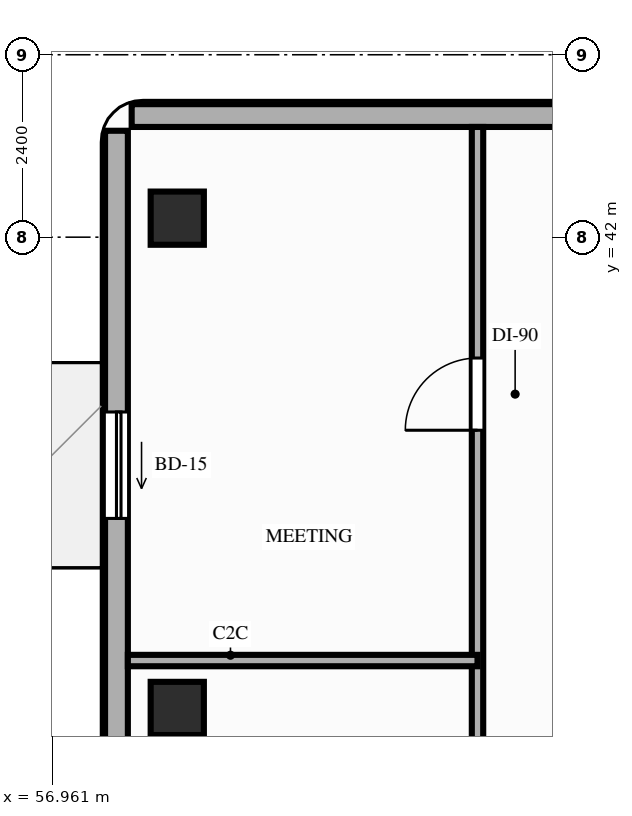
"""IFC4 building model, lengths in metres.
Left out: names, types, materials, properties, quantities, classifications, styles, units other than length and angle.
Written with IfcOpenShell. Run it as: python <this file> out.ifc"""

import sys

from ifc_helpers import new_model, si_unit, direction, frame, frame_2d, origin, origin_2d, place, context, subcontext, project, spatial, rectangle, extrude, element, fill, save


model = new_model("IFC4")
c1 = context("Model", 3, precision=1e-05, world=origin(), true_north=direction((0.0, 1.0)))
c2 = subcontext(c1, "Body", "Model", "MODEL_VIEW")
j1 = project(units=[si_unit("LENGTHUNIT", "METRE"), si_unit("PLANEANGLEUNIT", "RADIAN")], contexts=[c1])
p1 = place(None, origin())
s1 = spatial("IfcSite", under=j1, at=p1, CompositionType="ELEMENT")
p2 = place(p1, origin())
s2 = spatial("IfcBuilding", under=s1, at=p2, CompositionType="ELEMENT")
p3 = place(p2, frame((0.0, 0.0, 96.2)))
s3 = spatial("IfcBuildingStorey", under=s2, at=p3, CompositionType="ELEMENT", Elevation=96.2)
for number, where, z_axis, x_axis in (
    (1, (58.6, 35.8, 0.0), (0.0, 0.0, 1.0), (1.0, 0.0, 0.0)),
    (2, (58.6, 42.25, 0.0), (0.0, 0.0, 1.0), (1.0, 0.0, 0.0)),
):
    element("IfcColumn", number, at=place(p3, frame(where, z_axis=z_axis, x_axis=x_axis)), inside=s3, PredefinedType="COLUMN", context=c2, shape_type="SweptSolid", body=[
        extrude(rectangle(XDim=0.7, YDim=0.7, at=origin_2d()), origin(), (0.0, 0.0, 1.0), 3.2),
    ])
p4 = place(p3, frame((57.8, 43.4, 0.0), z_axis=(0.0, 0.0, 1.0), x_axis=(0.0, -1.0, 0.0)))
e3 = element("IfcWall", 3, at=p4, inside=s3, PredefinedType="STANDARD", context=c2, shape_type="SweptSolid", body=[
    extrude(rectangle(XDim=22.6, YDim=0.3, at=frame_2d((11.3, 0.0))), origin(), (0.0, 0.0, 1.0), 2.72),
])
p5 = place(p4, frame((3.7, 0.0, 0.0)))
e4 = element("IfcOpeningElement", 4, at=p5, cuts=e3, PredefinedType="OPENING", context=c2, shape_type="SweptSolid", body=[
    extrude(rectangle(XDim=1.4, YDim=2.1, at=frame_2d((0.7, 1.05))), frame((0.0, 0.16, 0.0), z_axis=(0.0, -1.0, 0.0), x_axis=(1.0, 0.0, 0.0)), (0.0, 0.0, 1.0), 0.32),
])
p6 = place(p4, frame((10.3, 0.0, 0.85)))
e5 = element("IfcOpeningElement", 5, at=p6, cuts=e3, PredefinedType="OPENING", context=c2, shape_type="SweptSolid", body=[
    extrude(rectangle(XDim=1.6, YDim=1.57, at=frame_2d((0.8, 0.785))), frame((0.0, 0.16, 0.0), z_axis=(0.0, -1.0, 0.0), x_axis=(1.0, 0.0, 0.0)), (0.0, 0.0, 1.0), 0.32),
])
p7 = place(p3, frame((72.8, 43.6, 0.0), z_axis=(0.0, 0.0, 1.0), x_axis=(-1.0, 0.0, 0.0)))
e6 = element("IfcWall", 6, at=p7, inside=s3, PredefinedType="STANDARD", context=c2, shape_type="SweptSolid", body=[
    extrude(rectangle(XDim=14.8, YDim=0.3, at=frame_2d((7.4, 0.0))), origin(), (0.0, 0.0, 1.0), 3.02),
])
p8 = place(p3, frame((62.55, 20.75, 0.0), z_axis=(0.0, 0.0, 1.0), x_axis=(0.0, 1.0, 0.0)))
e7 = element("IfcWall", 7, at=p8, inside=s3, PredefinedType="PARTITIONING", context=c2, shape_type="SweptSolid", body=[
    extrude(rectangle(XDim=22.7, YDim=0.15, at=frame_2d((11.35, 0.0))), origin(), (0.0, 0.0, 1.0), 2.6),
])
p9 = place(p8, frame((1.05, 0.0, 0.0)))
e8 = element("IfcOpeningElement", 8, at=p9, cuts=e7, PredefinedType="OPENING", context=c2, shape_type="SweptSolid", body=[
    extrude(rectangle(XDim=0.85, YDim=2.1, at=frame_2d((0.425, 1.05))), frame((0.0, 0.085, 0.0), z_axis=(0.0, -1.0, 0.0), x_axis=(1.0, 0.0, 0.0)), (0.0, 0.0, 1.0), 0.17),
])
p10 = place(p8, frame((3.43, 0.0, 0.0)))
e9 = element("IfcOpeningElement", 9, at=p10, cuts=e7, PredefinedType="OPENING", context=c2, shape_type="SweptSolid", body=[
    extrude(rectangle(XDim=0.95, YDim=2.1, at=frame_2d((0.475, 1.05))), frame((0.0, 0.085, 0.0), z_axis=(0.0, -1.0, 0.0), x_axis=(1.0, 0.0, 0.0)), (0.0, 0.0, 1.0), 0.17),
])
p11 = place(p8, frame((8.15, 0.0, 0.0)))
e10 = element("IfcOpeningElement", 10, at=p11, cuts=e7, PredefinedType="OPENING", context=c2, shape_type="SweptSolid", body=[
    extrude(rectangle(XDim=0.95, YDim=2.15, at=frame_2d((0.475, 1.075))), frame((0.0, 0.085, 0.0), z_axis=(0.0, -1.0, 0.0), x_axis=(1.0, 0.0, 0.0)), (0.0, 0.0, 1.0), 0.17),
])
p12 = place(p8, frame((12.14, 0.0, 0.0)))
e11 = element("IfcOpeningElement", 11, at=p12, cuts=e7, PredefinedType="OPENING", context=c2, shape_type="SweptSolid", body=[
    extrude(rectangle(XDim=0.95, YDim=2.15, at=frame_2d((0.475, 1.075))), frame((0.0, 0.085, 0.0), z_axis=(0.0, -1.0, 0.0), x_axis=(1.0, 0.0, 0.0)), (0.0, 0.0, 1.0), 0.17),
])
p13 = place(p8, frame((18.71, 0.0, 0.0)))
e12 = element("IfcOpeningElement", 12, at=p13, cuts=e7, PredefinedType="OPENING", context=c2, shape_type="SweptSolid", body=[
    extrude(rectangle(XDim=0.95, YDim=2.15, at=frame_2d((0.475, 1.075))), frame((0.0, 0.085, 0.0), z_axis=(0.0, -1.0, 0.0), x_axis=(1.0, 0.0, 0.0)), (0.0, 0.0, 1.0), 0.17),
])
p14 = place(p3, frame((57.95, 36.43, 0.0), z_axis=(0.0, 0.0, 1.0), x_axis=(1.0, 0.0, 0.0)))
e13 = element("IfcWall", 13, at=p14, inside=s3, PredefinedType="PARTITIONING", context=c2, shape_type="SweptSolid", body=[
    extrude(rectangle(XDim=4.6, YDim=0.15, at=frame_2d((2.3, 0.0))), origin(), (0.0, 0.0, 1.0), 2.6),
])
p15 = place(p5, origin())
e14 = element("IfcDoor", 14, at=p15, inside=s3, OperationType="SLIDING_TO_RIGHT", PredefinedType="DOOR", context=c2, shape_type="SweptSolid", body=[
    extrude(rectangle(XDim=1.4, YDim=2.1, at=frame_2d((0.7, 1.05))), frame((0.0, 0.025, 0.0), z_axis=(0.0, -1.0, 0.0), x_axis=(1.0, 0.0, 0.0)), (0.0, 0.0, 1.0), 0.05),
])
fill(e4, e14)
p16 = place(p13, origin())
e15 = element("IfcDoor", 15, at=p16, inside=s3, OperationType="SINGLE_SWING_LEFT", PredefinedType="DOOR", context=c2, shape_type="SweptSolid", body=[
    extrude(rectangle(XDim=0.95, YDim=2.15, at=frame_2d((0.475, 1.075))), frame((0.0, 0.025, 0.0), z_axis=(0.0, -1.0, 0.0), x_axis=(1.0, 0.0, 0.0)), (0.0, 0.0, 1.0), 0.05),
])
fill(e12, e15)
save(model, sys.argv[1])
